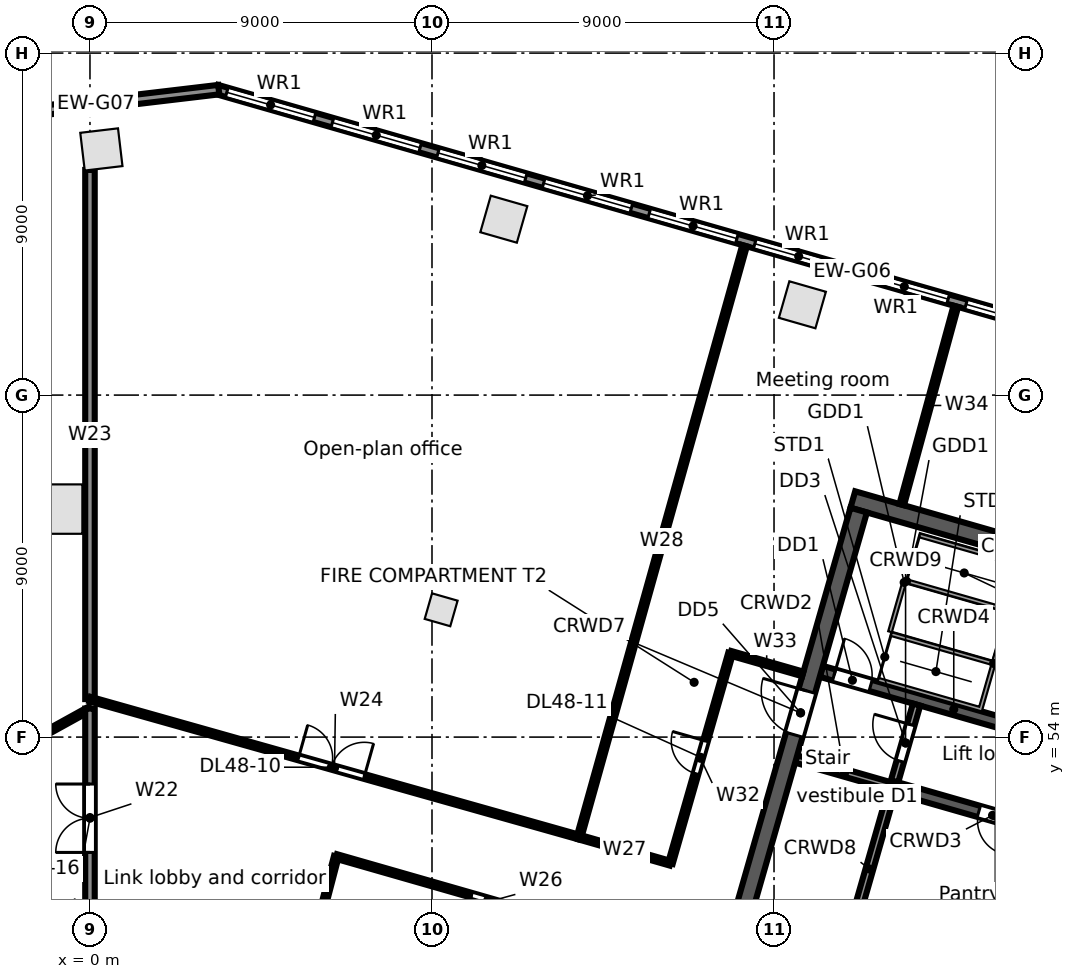
"""IFC4 building model, lengths in metres.
Left out: names, types, materials, properties, quantities, classifications, styles, units other than length and angle.
Written with IfcOpenShell. Run it as: python <this file> out.ifc"""

import sys

from ifc_helpers import new_model, si_unit, direction, frame, frame_2d, origin, origin_2d, place, context, subcontext, project, spatial, rectangle, extrude, element, fill, save


model = new_model("IFC4")
c1 = context("Model", 3, precision=1e-05, world=origin(), true_north=direction((0.0, 1.0)))
c2 = subcontext(c1, "Body", "Model", "MODEL_VIEW")
j1 = project(units=[si_unit("LENGTHUNIT", "METRE"), si_unit("PLANEANGLEUNIT", "RADIAN")], contexts=[c1])
p1 = place(None, origin())
s1 = spatial("IfcSite", under=j1, at=p1, CompositionType="ELEMENT")
p2 = place(p1, origin())
s2 = spatial("IfcBuilding", under=s1, at=p2, CompositionType="ELEMENT")
p3 = place(p2, frame((0.0, 0.0, 219.2)))
s3 = spatial("IfcBuildingStorey", under=s2, at=p3, CompositionType="ELEMENT", Elevation=219.2)
for number, where, z_axis, x_axis in (
    (1, (18.746, 65.376, 0.0), (0.0, 0.0, 1.0), (-0.961, 0.276, 0.0)),
    (2, (10.89, 67.629, 0.0), (0.0, 0.0, 1.0), (-0.961, 0.276, 0.0)),
    (3, (0.3, 69.464, 0.0), (0.0, 0.0, 1.0), (-0.993, -0.118, 0.0)),
):
    element("IfcColumn", number, at=place(p3, frame(where, z_axis=z_axis, x_axis=x_axis)), inside=s3, PredefinedType="COLUMN", context=c2, shape_type="SweptSolid", body=[
        extrude(rectangle(XDim=1.0, YDim=1.0, at=origin_2d()), origin(), (0.0, 0.0, 1.0), 3.9),
    ])
p4 = place(p3, frame((-0.85, 60.0, 0.0), z_axis=(0.0, 0.0, 1.0), x_axis=(0.0, 1.0, 0.0)))
e4 = element("IfcColumn", 4, at=p4, inside=s3, PredefinedType="COLUMN", context=c2, shape_type="SweptSolid", body=[
    extrude(rectangle(XDim=1.3, YDim=1.3, at=origin_2d()), origin(), (0.0, 0.0, 1.0), 3.9),
])
p5 = place(p3, frame((9.241, 57.35, 0.0), z_axis=(0.0, 0.0, 1.0), x_axis=(0.961261695938, -0.275637355817, 0.0)))
e5 = element("IfcColumn", 5, at=p5, inside=s3, PredefinedType="COLUMN", context=c2, shape_type="SweptSolid", body=[
    extrude(rectangle(XDim=0.7, YDim=0.7, at=origin_2d()), origin(), (0.0, 0.0, 1.0), 3.9),
])
p6 = place(p3, frame((3.34, 71.042, 0.0), z_axis=(0.0, 0.0, 1.0), x_axis=(0.96126179431, -0.275637012753, 0.0)))
e6 = element("IfcWall", 6, at=p6, inside=s3, PredefinedType="STANDARD", context=c2, shape_type="SweptSolid", body=[
    extrude(rectangle(XDim=34.779, YDim=0.25, at=frame_2d((17.39, 0.0))), origin(), (0.0, 0.0, 1.0), 3.62),
])
p7 = place(p6, frame((32.071, 0.0, 0.8)))
e7 = element("IfcOpeningElement", 7, at=p7, cuts=e6, PredefinedType="OPENING", context=c2, shape_type="SweptSolid", body=[
    extrude(rectangle(XDim=2.4, YDim=2.2, at=frame_2d((1.2, 1.1))), frame((0.0, 0.135, 0.0), z_axis=(0.0, -1.0, 0.0), x_axis=(1.0, 0.0, 0.0)), (0.0, 0.0, 1.0), 0.27),
])
p8 = place(p6, frame((29.18, 0.0, 0.8)))
e8 = element("IfcOpeningElement", 8, at=p8, cuts=e6, PredefinedType="OPENING", context=c2, shape_type="SweptSolid", body=[
    extrude(rectangle(XDim=2.4, YDim=2.2, at=frame_2d((1.2, 1.1))), frame((0.0, 0.135, 0.0), z_axis=(0.0, -1.0, 0.0), x_axis=(1.0, 0.0, 0.0)), (0.0, 0.0, 1.0), 0.27),
])
p9 = place(p6, frame((26.289, 0.0, 0.8)))
e9 = element("IfcOpeningElement", 9, at=p9, cuts=e6, PredefinedType="OPENING", context=c2, shape_type="SweptSolid", body=[
    extrude(rectangle(XDim=2.4, YDim=2.2, at=frame_2d((1.2, 1.1))), frame((0.0, 0.135, 0.0), z_axis=(0.0, -1.0, 0.0), x_axis=(1.0, 0.0, 0.0)), (0.0, 0.0, 1.0), 0.27),
])
p10 = place(p6, frame((23.398, 0.0, 0.8)))
e10 = element("IfcOpeningElement", 10, at=p10, cuts=e6, PredefinedType="OPENING", context=c2, shape_type="SweptSolid", body=[
    extrude(rectangle(XDim=2.4, YDim=2.2, at=frame_2d((1.2, 1.1))), frame((0.0, 0.135, 0.0), z_axis=(0.0, -1.0, 0.0), x_axis=(1.0, 0.0, 0.0)), (0.0, 0.0, 1.0), 0.27),
])
p11 = place(p6, frame((20.508, 0.0, 0.8)))
e11 = element("IfcOpeningElement", 11, at=p11, cuts=e6, PredefinedType="OPENING", context=c2, shape_type="SweptSolid", body=[
    extrude(rectangle(XDim=2.4, YDim=2.2, at=frame_2d((1.2, 1.1))), frame((0.0, 0.135, 0.0), z_axis=(0.0, -1.0, 0.0), x_axis=(1.0, 0.0, 0.0)), (0.0, 0.0, 1.0), 0.27),
])
p12 = place(p6, frame((17.616, 0.0, 0.8)))
e12 = element("IfcOpeningElement", 12, at=p12, cuts=e6, PredefinedType="OPENING", context=c2, shape_type="SweptSolid", body=[
    extrude(rectangle(XDim=2.4, YDim=2.2, at=frame_2d((1.2, 1.1))), frame((0.0, 0.135, 0.0), z_axis=(0.0, -1.0, 0.0), x_axis=(1.0, 0.0, 0.0)), (0.0, 0.0, 1.0), 0.27),
])
p13 = place(p6, frame((14.726, 0.0, 0.8)))
e13 = element("IfcOpeningElement", 13, at=p13, cuts=e6, PredefinedType="OPENING", context=c2, shape_type="SweptSolid", body=[
    extrude(rectangle(XDim=2.4, YDim=2.2, at=frame_2d((1.2, 1.1))), frame((0.0, 0.135, 0.0), z_axis=(0.0, -1.0, 0.0), x_axis=(1.0, 0.0, 0.0)), (0.0, 0.0, 1.0), 0.27),
])
p14 = place(p6, frame((11.834, 0.0, 0.8)))
e14 = element("IfcOpeningElement", 14, at=p14, cuts=e6, PredefinedType="OPENING", context=c2, shape_type="SweptSolid", body=[
    extrude(rectangle(XDim=2.4, YDim=2.2, at=frame_2d((1.2, 1.1))), frame((0.0, 0.135, 0.0), z_axis=(0.0, -1.0, 0.0), x_axis=(1.0, 0.0, 0.0)), (0.0, 0.0, 1.0), 0.27),
])
p15 = place(p6, frame((8.944, 0.0, 0.8)))
e15 = element("IfcOpeningElement", 15, at=p15, cuts=e6, PredefinedType="OPENING", context=c2, shape_type="SweptSolid", body=[
    extrude(rectangle(XDim=2.4, YDim=2.2, at=frame_2d((1.2, 1.1))), frame((0.0, 0.135, 0.0), z_axis=(0.0, -1.0, 0.0), x_axis=(1.0, 0.0, 0.0)), (0.0, 0.0, 1.0), 0.27),
])
p16 = place(p6, frame((6.052, 0.0, 0.8)))
e16 = element("IfcOpeningElement", 16, at=p16, cuts=e6, PredefinedType="OPENING", context=c2, shape_type="SweptSolid", body=[
    extrude(rectangle(XDim=2.4, YDim=2.2, at=frame_2d((1.2, 1.1))), frame((0.0, 0.135, 0.0), z_axis=(0.0, -1.0, 0.0), x_axis=(1.0, 0.0, 0.0)), (0.0, 0.0, 1.0), 0.27),
])
p17 = place(p6, frame((3.162, 0.0, 0.8)))
e17 = element("IfcOpeningElement", 17, at=p17, cuts=e6, PredefinedType="OPENING", context=c2, shape_type="SweptSolid", body=[
    extrude(rectangle(XDim=2.4, YDim=2.2, at=frame_2d((1.2, 1.1))), frame((0.0, 0.135, 0.0), z_axis=(0.0, -1.0, 0.0), x_axis=(1.0, 0.0, 0.0)), (0.0, 0.0, 1.0), 0.27),
])
p18 = place(p6, frame((0.271, 0.0, 0.8)))
e18 = element("IfcOpeningElement", 18, at=p18, cuts=e6, PredefinedType="OPENING", context=c2, shape_type="SweptSolid", body=[
    extrude(rectangle(XDim=2.4, YDim=2.2, at=frame_2d((1.2, 1.1))), frame((0.0, 0.135, 0.0), z_axis=(0.0, -1.0, 0.0), x_axis=(1.0, 0.0, 0.0)), (0.0, 0.0, 1.0), 0.27),
])
p19 = place(p3, frame((-3.071, 70.273, 0.0), z_axis=(0.0, 0.0, 1.0), x_axis=(0.993064524962, 0.11757061394, 0.0)))
e19 = element("IfcWall", 19, at=p19, inside=s3, PredefinedType="STANDARD", context=c2, shape_type="SweptSolid", body=[
    extrude(rectangle(XDim=6.506, YDim=0.25, at=frame_2d((3.253, 0.0))), origin(), (0.0, 0.0, 1.0), 3.62),
])
p20 = place(p3, frame((18.583, 53.423, 0.0), z_axis=(0.0, 0.0, 1.0), x_axis=(0.961259287968, -0.275645753268, 0.0)))
e20 = element("IfcWall", 20, at=p20, inside=s3, PredefinedType="SOLIDWALL", context=c2, shape_type="SweptSolid", body=[
    extrude(rectangle(XDim=2.65, YDim=0.2, at=frame_2d((1.325, 0.0))), origin(), (0.0, 0.0, 1.0), 3.62),
])
p21 = place(p3, frame((21.131, 52.692, 0.0), z_axis=(0.0, 0.0, 1.0), x_axis=(0.961261488075, -0.275638080722, 0.0)))
e21 = element("IfcWall", 21, at=p21, inside=s3, PredefinedType="SOLIDWALL", context=c2, shape_type="SweptSolid", body=[
    extrude(rectangle(XDim=5.45, YDim=0.3, at=frame_2d((2.725, 0.0))), origin(), (0.0, 0.0, 1.0), 3.62),
])
p22 = place(p21, frame((2.35, 0.0, 0.0)))
e22 = element("IfcOpeningElement", 22, at=p22, cuts=e21, PredefinedType="OPENING", context=c2, shape_type="SweptSolid", body=[
    extrude(rectangle(XDim=0.9, YDim=2.1, at=frame_2d((0.45, 1.05))), frame((0.0, 0.16, 0.0), z_axis=(0.0, -1.0, 0.0), x_axis=(1.0, 0.0, 0.0)), (0.0, 0.0, 1.0), 0.32),
])
p23 = place(p3, frame((19.245, 55.73, 0.0), z_axis=(0.0, 0.0, 1.0), x_axis=(0.961263007877, -0.275632780503, 0.0)))
e23 = element("IfcWall", 23, at=p23, inside=s3, PredefinedType="SOLIDWALL", context=c2, shape_type="SweptSolid", body=[
    extrude(rectangle(XDim=7.25, YDim=0.3, at=frame_2d((3.625, 0.0))), origin(), (0.0, 0.0, 1.0), 3.62),
])
p24 = place(p23, frame((0.35, 0.0, 0.0)))
e24 = element("IfcOpeningElement", 24, at=p24, cuts=e23, PredefinedType="OPENING", context=c2, shape_type="SweptSolid", body=[
    extrude(rectangle(XDim=1.0, YDim=2.1, at=frame_2d((0.5, 1.05))), frame((0.0, 0.16, 0.0), z_axis=(0.0, -1.0, 0.0), x_axis=(1.0, 0.0, 0.0)), (0.0, 0.0, 1.0), 0.32),
])
p25 = place(p3, frame((20.073, 60.252, 0.0), z_axis=(0.0, 0.0, 1.0), x_axis=(0.96126248289, -0.275634611374, 0.0)))
e25 = element("IfcWall", 25, at=p25, inside=s3, PredefinedType="SOLIDWALL", context=c2, shape_type="SweptSolid", body=[
    extrude(rectangle(XDim=9.0, YDim=0.45, at=frame_2d((4.5, 0.0))), origin(), (0.0, 0.0, 1.0), 3.62),
])
p26 = place(p3, frame((17.168, 49.303, 0.0), z_axis=(0.0, 0.0, 1.0), x_axis=(0.275638974822, 0.961261231695, 0.0)))
e26 = element("IfcWall", 26, at=p26, inside=s3, PredefinedType="SOLIDWALL", context=c2, shape_type="SweptSolid", body=[
    extrude(rectangle(XDim=11.1, YDim=0.45, at=frame_2d((5.55, 0.0))), origin(), (0.0, 0.0, 1.0), 3.62),
])
p27 = place(p26, frame((4.95, 0.0, 0.0)))
e27 = element("IfcOpeningElement", 27, at=p27, cuts=e26, PredefinedType="OPENING", context=c2, shape_type="SweptSolid", body=[
    extrude(rectangle(XDim=1.2, YDim=2.1, at=frame_2d((0.6, 1.05))), frame((0.0, 0.235, 0.0), z_axis=(0.0, -1.0, 0.0), x_axis=(1.0, 0.0, 0.0)), (0.0, 0.0, 1.0), 0.47),
])
p28 = place(p3, frame((19.932, 48.511, 0.0), z_axis=(0.0, 0.0, 1.0), x_axis=(0.275642273411, 0.961260285827, 0.0)))
e28 = element("IfcWall", 28, at=p28, inside=s3, PredefinedType="SOLIDWALL", context=c2, shape_type="SweptSolid", body=[
    extrude(rectangle(XDim=4.2, YDim=0.2, at=frame_2d((2.1, 0.0))), origin(), (0.0, 0.0, 1.0), 3.62),
])
p29 = place(p3, frame((21.172, 52.837, 0.0), z_axis=(0.0, 0.0, 1.0), x_axis=(0.275657676022, 0.961255868981, 0.0)))
e29 = element("IfcWall", 29, at=p29, inside=s3, PredefinedType="PARTITIONING", context=c2, shape_type="SweptSolid", body=[
    extrude(rectangle(XDim=2.1, YDim=0.2, at=frame_2d((1.05, 0.0))), origin(), (0.0, 0.0, 1.0), 3.62),
])
p30 = place(p29, frame((0.55, 0.0, 0.0)))
e30 = element("IfcOpeningElement", 30, at=p30, cuts=e29, PredefinedType="OPENING", context=c2, shape_type="SweptSolid", body=[
    extrude(rectangle(XDim=1.0, YDim=2.1, at=frame_2d((0.5, 1.05))), frame((0.0, 0.11, 0.0), z_axis=(0.0, -1.0, 0.0), x_axis=(1.0, 0.0, 0.0)), (0.0, 0.0, 1.0), 0.22),
])
p31 = place(p3, frame((-6.053, 51.405, 0.0), z_axis=(0.0, 0.0, 1.0), x_axis=(0.875247434681, 0.483675436718, 0.0)))
e31 = element("IfcWall", 31, at=p31, inside=s3, PredefinedType="PARTITIONING", context=c2, shape_type="SweptSolid", body=[
    extrude(rectangle(XDim=6.916, YDim=0.125, at=frame_2d((3.458, 0.0))), origin(), (0.0, 0.0, 1.0), 2.8),
])
p32 = place(p31, frame((2.45, 0.0, 0.0)))
e32 = element("IfcOpeningElement", 32, at=p32, cuts=e31, PredefinedType="OPENING", context=c2, shape_type="SweptSolid", body=[
    extrude(rectangle(XDim=1.8, YDim=2.1, at=frame_2d((0.9, 1.05))), frame((0.0, 0.073, 0.0), z_axis=(0.0, -1.0, 0.0), x_axis=(1.0, 0.0, 0.0)), (0.0, 0.0, 1.0), 0.145),
])
p33 = place(p3, frame((0.0, 49.015, 0.0), z_axis=(0.0, 0.0, 1.0), x_axis=(0.0, 1.0, 0.0)))
e33 = element("IfcWall", 33, at=p33, inside=s3, PredefinedType="PARTITIONING", context=c2, shape_type="SweptSolid", body=[
    extrude(rectangle(XDim=5.735, YDim=0.25, at=frame_2d((2.868, 0.0))), origin(), (0.0, 0.0, 1.0), 3.62),
])
p34 = place(p33, frame((1.95, 0.0, 0.0)))
e34 = element("IfcOpeningElement", 34, at=p34, cuts=e33, PredefinedType="OPENING", context=c2, shape_type="SweptSolid", body=[
    extrude(rectangle(XDim=1.8, YDim=2.1, at=frame_2d((0.9, 1.05))), frame((0.0, 0.135, 0.0), z_axis=(0.0, -1.0, 0.0), x_axis=(1.0, 0.0, 0.0)), (0.0, 0.0, 1.0), 0.27),
])
p35 = place(p3, frame((0.0, 55.0, 0.0), z_axis=(0.0, 0.0, 1.0), x_axis=(0.0, 1.0, 0.0)))
e35 = element("IfcWall", 35, at=p35, inside=s3, PredefinedType="PARTITIONING", context=c2, shape_type="SweptSolid", body=[
    extrude(rectangle(XDim=13.925, YDim=0.25, at=frame_2d((6.962, 0.0))), origin(), (0.0, 0.0, 1.0), 2.8),
])
p36 = place(p3, frame((0.0, 55.0, 0.0), z_axis=(0.0, 0.0, 1.0), x_axis=(0.962402937884, -0.271625818271, 0.0)))
e36 = element("IfcWall", 36, at=p36, inside=s3, PredefinedType="PARTITIONING", context=c2, shape_type="SweptSolid", body=[
    extrude(rectangle(XDim=13.372, YDim=0.125, at=frame_2d((6.686, 0.0))), origin(), (0.0, 0.0, 1.0), 2.8),
])
p37 = place(p36, frame((5.7, 0.0, 0.0)))
e37 = element("IfcOpeningElement", 37, at=p37, cuts=e36, PredefinedType="OPENING", context=c2, shape_type="SweptSolid", body=[
    extrude(rectangle(XDim=1.8, YDim=2.1, at=frame_2d((0.9, 1.05))), frame((0.0, 0.073, 0.0), z_axis=(0.0, -1.0, 0.0), x_axis=(1.0, 0.0, 0.0)), (0.0, 0.0, 1.0), 0.145),
])
p38 = place(p3, frame((5.364, 46.592, 0.0), z_axis=(0.0, 0.0, 1.0), x_axis=(0.253446952203, 0.967349286669, 0.0)))
e38 = element("IfcWall", 38, at=p38, inside=s3, PredefinedType="PARTITIONING", context=c2, shape_type="SweptSolid", body=[
    extrude(rectangle(XDim=4.411, YDim=0.125, at=frame_2d((2.206, 0.0))), origin(), (0.0, 0.0, 1.0), 2.988),
])
p39 = place(p3, frame((6.482, 50.859, 0.0), z_axis=(0.0, 0.0, 1.0), x_axis=(0.961261196169, -0.275639098713, 0.0)))
e39 = element("IfcWall", 39, at=p39, inside=s3, PredefinedType="PARTITIONING", context=c2, shape_type="SweptSolid", body=[
    extrude(rectangle(XDim=8.5, YDim=0.125, at=frame_2d((4.25, 0.0))), origin(), (0.0, 0.0, 1.0), 2.8),
])
p40 = place(p39, frame((3.7, 0.0, 0.0)))
e40 = element("IfcOpeningElement", 40, at=p40, cuts=e39, PredefinedType="OPENING", context=c2, shape_type="SweptSolid", body=[
    extrude(rectangle(XDim=0.9, YDim=2.1, at=frame_2d((0.45, 1.05))), frame((0.0, 0.073, 0.0), z_axis=(0.0, -1.0, 0.0), x_axis=(1.0, 0.0, 0.0)), (0.0, 0.0, 1.0), 0.145),
])
p41 = place(p3, frame((12.869, 51.368, 0.0), z_axis=(0.0, 0.0, 1.0), x_axis=(0.961302601161, -0.275494662382, 0.0)))
e41 = element("IfcWall", 41, at=p41, inside=s3, PredefinedType="PARTITIONING", context=c2, shape_type="SweptSolid", body=[
    extrude(rectangle(XDim=2.501, YDim=0.125, at=frame_2d((1.25, 0.0))), origin(), (0.0, 0.0, 1.0), 3.62),
])
p42 = place(p3, frame((12.869, 51.368, 0.0), z_axis=(0.0, 0.0, 1.0), x_axis=(0.269547555311, 0.962987079574, 0.0)))
e42 = element("IfcWall", 42, at=p42, inside=s3, PredefinedType="PARTITIONING", context=c2, shape_type="SweptSolid", body=[
    extrude(rectangle(XDim=16.161, YDim=0.125, at=frame_2d((8.081, 0.0))), origin(), (0.0, 0.0, 1.0), 2.792),
])
p43 = place(p3, frame((15.273, 50.679, 0.0), z_axis=(0.0, 0.0, 1.0), x_axis=(0.275494973205, 0.961302512084, 0.0)))
e43 = element("IfcWall", 43, at=p43, inside=s3, PredefinedType="PARTITIONING", context=c2, shape_type="SweptSolid", body=[
    extrude(rectangle(XDim=5.75, YDim=0.125, at=frame_2d((2.875, 0.0))), origin(), (0.0, 0.0, 1.0), 2.8),
])
p44 = place(p43, frame((2.45, 0.0, 0.0)))
e44 = element("IfcOpeningElement", 44, at=p44, cuts=e43, PredefinedType="OPENING", context=c2, shape_type="SweptSolid", body=[
    extrude(rectangle(XDim=0.9, YDim=2.1, at=frame_2d((0.45, 1.05))), frame((0.0, 0.073, 0.0), z_axis=(0.0, -1.0, 0.0), x_axis=(1.0, 0.0, 0.0)), (0.0, 0.0, 1.0), 0.145),
])
p45 = place(p3, frame((16.857, 56.206, 0.0), z_axis=(0.0, 0.0, 1.0), x_axis=(0.961383985066, -0.275210525341, 0.0)))
e45 = element("IfcWall", 45, at=p45, inside=s3, PredefinedType="PARTITIONING", context=c2, shape_type="SweptSolid", body=[
    extrude(rectangle(XDim=1.977, YDim=0.125, at=frame_2d((0.988, 0.0))), origin(), (0.0, 0.0, 1.0), 3.62),
])
p46 = place(p3, frame((21.36, 60.117, 0.0), z_axis=(0.0, 0.0, 1.0), x_axis=(0.263151767798, 0.964754449124, 0.0)))
e46 = element("IfcWall", 46, at=p46, inside=s3, PredefinedType="PARTITIONING", context=c2, shape_type="SweptSolid", body=[
    extrude(rectangle(XDim=5.411, YDim=0.125, at=frame_2d((2.705, 0.0))), origin(), (0.0, 0.0, 1.0), 3.0),
])
p47 = place(p11, origin())
e47 = element("IfcWindow", 47, at=p47, inside=s3, PartitioningType="SINGLE_PANEL", PredefinedType="WINDOW", context=c2, shape_type="SweptSolid", body=[
    extrude(rectangle(XDim=2.4, YDim=2.2, at=frame_2d((1.2, 1.1))), frame((0.0, 0.03, 0.0), z_axis=(0.0, -1.0, 0.0), x_axis=(1.0, 0.0, 0.0)), (0.0, 0.0, 1.0), 0.06),
])
fill(e11, e47)
p48 = place(p12, origin())
e48 = element("IfcWindow", 48, at=p48, inside=s3, PartitioningType="SINGLE_PANEL", PredefinedType="WINDOW", context=c2, shape_type="SweptSolid", body=[
    extrude(rectangle(XDim=2.4, YDim=2.2, at=frame_2d((1.2, 1.1))), frame((0.0, 0.03, 0.0), z_axis=(0.0, -1.0, 0.0), x_axis=(1.0, 0.0, 0.0)), (0.0, 0.0, 1.0), 0.06),
])
fill(e12, e48)
p49 = place(p13, origin())
e49 = element("IfcWindow", 49, at=p49, inside=s3, PartitioningType="SINGLE_PANEL", PredefinedType="WINDOW", context=c2, shape_type="SweptSolid", body=[
    extrude(rectangle(XDim=2.4, YDim=2.2, at=frame_2d((1.2, 1.1))), frame((0.0, 0.03, 0.0), z_axis=(0.0, -1.0, 0.0), x_axis=(1.0, 0.0, 0.0)), (0.0, 0.0, 1.0), 0.06),
])
fill(e13, e49)
p50 = place(p14, origin())
e50 = element("IfcWindow", 50, at=p50, inside=s3, PartitioningType="SINGLE_PANEL", PredefinedType="WINDOW", context=c2, shape_type="SweptSolid", body=[
    extrude(rectangle(XDim=2.4, YDim=2.2, at=frame_2d((1.2, 1.1))), frame((0.0, 0.03, 0.0), z_axis=(0.0, -1.0, 0.0), x_axis=(1.0, 0.0, 0.0)), (0.0, 0.0, 1.0), 0.06),
])
fill(e14, e50)
p51 = place(p15, origin())
e51 = element("IfcWindow", 51, at=p51, inside=s3, PartitioningType="SINGLE_PANEL", PredefinedType="WINDOW", context=c2, shape_type="SweptSolid", body=[
    extrude(rectangle(XDim=2.4, YDim=2.2, at=frame_2d((1.2, 1.1))), frame((0.0, 0.03, 0.0), z_axis=(0.0, -1.0, 0.0), x_axis=(1.0, 0.0, 0.0)), (0.0, 0.0, 1.0), 0.06),
])
fill(e15, e51)
p52 = place(p16, origin())
e52 = element("IfcWindow", 52, at=p52, inside=s3, PartitioningType="SINGLE_PANEL", PredefinedType="WINDOW", context=c2, shape_type="SweptSolid", body=[
    extrude(rectangle(XDim=2.4, YDim=2.2, at=frame_2d((1.2, 1.1))), frame((0.0, 0.03, 0.0), z_axis=(0.0, -1.0, 0.0), x_axis=(1.0, 0.0, 0.0)), (0.0, 0.0, 1.0), 0.06),
])
fill(e16, e52)
p53 = place(p17, origin())
e53 = element("IfcWindow", 53, at=p53, inside=s3, PartitioningType="SINGLE_PANEL", PredefinedType="WINDOW", context=c2, shape_type="SweptSolid", body=[
    extrude(rectangle(XDim=2.4, YDim=2.2, at=frame_2d((1.2, 1.1))), frame((0.0, 0.03, 0.0), z_axis=(0.0, -1.0, 0.0), x_axis=(1.0, 0.0, 0.0)), (0.0, 0.0, 1.0), 0.06),
])
fill(e17, e53)
p54 = place(p18, origin())
e54 = element("IfcWindow", 54, at=p54, inside=s3, PartitioningType="SINGLE_PANEL", PredefinedType="WINDOW", context=c2, shape_type="SweptSolid", body=[
    extrude(rectangle(XDim=2.4, YDim=2.2, at=frame_2d((1.2, 1.1))), frame((0.0, 0.03, 0.0), z_axis=(0.0, -1.0, 0.0), x_axis=(1.0, 0.0, 0.0)), (0.0, 0.0, 1.0), 0.06),
])
fill(e18, e54)
p55 = place(p24, origin())
e55 = element("IfcDoor", 55, at=p55, inside=s3, OperationType="SINGLE_SWING_LEFT", PredefinedType="DOOR", context=c2, shape_type="SweptSolid", body=[
    extrude(rectangle(XDim=1.0, YDim=2.1, at=frame_2d((0.5, 1.05))), frame((0.0, 0.025, 0.0), z_axis=(0.0, -1.0, 0.0), x_axis=(1.0, 0.0, 0.0)), (0.0, 0.0, 1.0), 0.05),
])
fill(e24, e55)
p56 = place(p30, origin())
e56 = element("IfcDoor", 56, at=p56, inside=s3, OperationType="SINGLE_SWING_RIGHT", PredefinedType="DOOR", context=c2, shape_type="SweptSolid", body=[
    extrude(rectangle(XDim=1.0, YDim=2.1, at=frame_2d((0.5, 1.05))), frame((0.0, 0.025, 0.0), z_axis=(0.0, -1.0, 0.0), x_axis=(1.0, 0.0, 0.0)), (0.0, 0.0, 1.0), 0.05),
])
fill(e30, e56)
p57 = place(p27, origin())
e57 = element("IfcDoor", 57, at=p57, inside=s3, OperationType="SINGLE_SWING_RIGHT", PredefinedType="DOOR", context=c2, shape_type="SweptSolid", body=[
    extrude(rectangle(XDim=1.2, YDim=2.1, at=frame_2d((0.6, 1.05))), frame((0.0, 0.025, 0.0), z_axis=(0.0, -1.0, 0.0), x_axis=(1.0, 0.0, 0.0)), (0.0, 0.0, 1.0), 0.05),
])
fill(e27, e57)
p58 = place(p22, frame((0.9, 0.0, 0.0), z_axis=(0.0, 0.0, 1.0), x_axis=(-1.0, 0.0, 0.0)))
e58 = element("IfcDoor", 58, at=p58, inside=s3, OperationType="SINGLE_SWING_LEFT", PredefinedType="DOOR", context=c2, shape_type="SweptSolid", body=[
    extrude(rectangle(XDim=0.9, YDim=2.1, at=frame_2d((0.45, 1.05))), frame((0.0, 0.025, 0.0), z_axis=(0.0, -1.0, 0.0), x_axis=(1.0, 0.0, 0.0)), (0.0, 0.0, 1.0), 0.05),
])
fill(e22, e58)
p59 = place(p37, origin())
e59 = element("IfcDoor", 59, at=p59, inside=s3, OperationType="DOUBLE_DOOR_SINGLE_SWING", PredefinedType="DOOR", context=c2, shape_type="SweptSolid", body=[
    extrude(rectangle(XDim=1.8, YDim=2.1, at=frame_2d((0.9, 1.05))), frame((0.0, 0.025, 0.0), z_axis=(0.0, -1.0, 0.0), x_axis=(1.0, 0.0, 0.0)), (0.0, 0.0, 1.0), 0.05),
])
fill(e37, e59)
p60 = place(p44, origin())
e60 = element("IfcDoor", 60, at=p60, inside=s3, OperationType="SINGLE_SWING_RIGHT", PredefinedType="DOOR", context=c2, shape_type="SweptSolid", body=[
    extrude(rectangle(XDim=0.9, YDim=2.1, at=frame_2d((0.45, 1.05))), frame((0.0, 0.025, 0.0), z_axis=(0.0, -1.0, 0.0), x_axis=(1.0, 0.0, 0.0)), (0.0, 0.0, 1.0), 0.05),
])
fill(e44, e60)
p61 = place(p40, frame((0.9, 0.0, 0.0), z_axis=(0.0, 0.0, 1.0), x_axis=(-1.0, 0.0, 0.0)))
e61 = element("IfcDoor", 61, at=p61, inside=s3, OperationType="SINGLE_SWING_RIGHT", PredefinedType="DOOR", context=c2, shape_type="SweptSolid", body=[
    extrude(rectangle(XDim=0.9, YDim=2.1, at=frame_2d((0.45, 1.05))), frame((0.0, 0.025, 0.0), z_axis=(0.0, -1.0, 0.0), x_axis=(1.0, 0.0, 0.0)), (0.0, 0.0, 1.0), 0.05),
])
fill(e40, e61)
p62 = place(p34, origin())
e62 = element("IfcDoor", 62, at=p62, inside=s3, OperationType="DOUBLE_DOOR_SINGLE_SWING", PredefinedType="DOOR", context=c2, shape_type="SweptSolid", body=[
    extrude(rectangle(XDim=1.8, YDim=2.1, at=frame_2d((0.9, 1.05))), frame((0.0, 0.025, 0.0), z_axis=(0.0, -1.0, 0.0), x_axis=(1.0, 0.0, 0.0)), (0.0, 0.0, 1.0), 0.05),
])
fill(e34, e62)
save(model, sys.argv[1])
